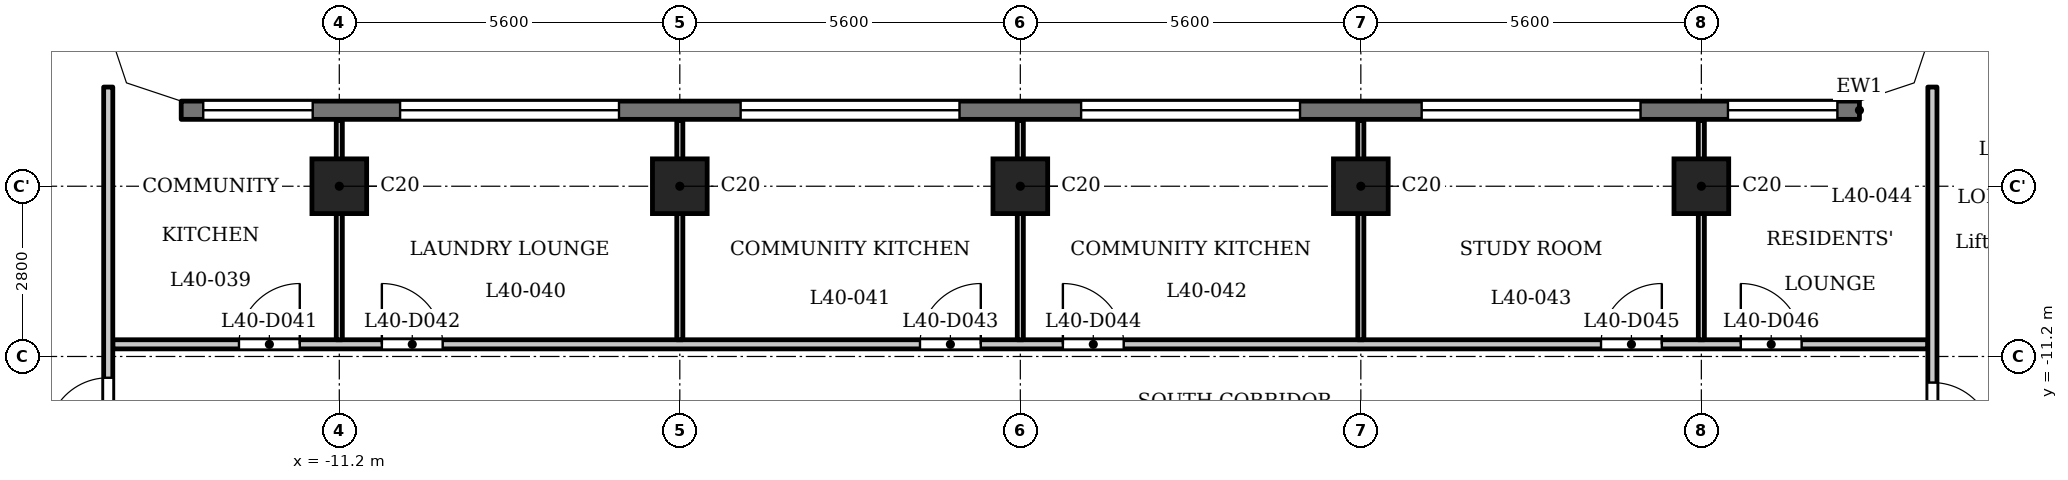
"""IFC4 building model, lengths in metres.
Left out: names, types, materials, properties, quantities, classifications, styles, units other than length and angle.
Written with IfcOpenShell. Run it as: python <this file> out.ifc"""

import sys

from ifc_helpers import new_model, si_unit, direction, frame, frame_2d, origin, origin_2d, place, context, subcontext, project, spatial, polyline, rectangle, outline, extrude, element, fill, save


model = new_model("IFC4")
c1 = context("Model", 3, precision=1e-05, world=origin(), true_north=direction((0.0, 1.0)))
c2 = subcontext(c1, "Body", "Model", "MODEL_VIEW")
j1 = project(units=[si_unit("LENGTHUNIT", "METRE"), si_unit("PLANEANGLEUNIT", "RADIAN")], contexts=[c1])
p1 = place(None, origin())
s1 = spatial("IfcSite", under=j1, at=p1, CompositionType="ELEMENT")
p2 = place(p1, origin())
s2 = spatial("IfcBuilding", under=s1, at=p2, CompositionType="ELEMENT")
p3 = place(p2, frame((0.0, 0.0, 157.1)))
s3 = spatial("IfcBuildingStorey", under=s2, at=p3, CompositionType="ELEMENT", Elevation=157.1)
for number, where, z_axis, x_axis in (
    (1, (-11.2, -8.4, 0.0), (0.0, 0.0, 1.0), (1.0, 0.0, 0.0)),
    (2, (-5.6, -8.4, 0.0), (0.0, 0.0, 1.0), (1.0, 0.0, 0.0)),
    (3, (0.0, -8.4, 0.0), (0.0, 0.0, 1.0), (1.0, 0.0, 0.0)),
    (4, (5.6, -8.4, 0.0), (0.0, 0.0, 1.0), (1.0, 0.0, 0.0)),
    (5, (11.2, -8.4, 0.0), (0.0, 0.0, 1.0), (1.0, 0.0, 0.0)),
):
    element("IfcColumn", number, at=place(p3, frame(where, z_axis=z_axis, x_axis=x_axis)), inside=s3, PredefinedType="COLUMN", context=c2, shape_type="SweptSolid", body=[
        extrude(rectangle(XDim=0.9, YDim=0.9, at=origin_2d()), origin(), (0.0, 0.0, 1.0), 3.5),
    ])
p4 = place(p3, frame((13.8, -7.15, 0.0), z_axis=(0.0, 0.0, 1.0), x_axis=(-1.0, 0.0, 0.0)))
e6 = element("IfcWall", 6, at=p4, inside=s3, PredefinedType="SOLIDWALL", context=c2, shape_type="SweptSolid", body=[
    extrude(rectangle(XDim=27.6, YDim=0.3, at=frame_2d((13.8, 0.0))), origin(), (0.0, 0.0, 1.0), 3.2),
])
p5 = place(p4, frame((0.363, 0.0, 0.9)))
e7 = element("IfcOpeningElement", 7, at=p5, cuts=e6, PredefinedType="OPENING", context=c2, shape_type="SweptSolid", body=[
    extrude(rectangle(XDim=1.8, YDim=1.25, at=frame_2d((0.9, 0.625))), frame((0.0, 0.16, 0.0), z_axis=(0.0, -1.0, 0.0), x_axis=(1.0, 0.0, 0.0)), (0.0, 0.0, 1.0), 0.32),
])
p6 = place(p4, frame((3.6, 0.0, 1.2)))
e8 = element("IfcOpeningElement", 8, at=p6, cuts=e6, PredefinedType="OPENING", context=c2, shape_type="SweptSolid", body=[
    extrude(rectangle(XDim=3.6, YDim=0.95, at=frame_2d((1.8, 0.475))), frame((0.0, 0.16, 0.0), z_axis=(0.0, -1.0, 0.0), x_axis=(1.0, 0.0, 0.0)), (0.0, 0.0, 1.0), 0.32),
])
p7 = place(p4, frame((9.2, 0.0, 1.2)))
e9 = element("IfcOpeningElement", 9, at=p7, cuts=e6, PredefinedType="OPENING", context=c2, shape_type="SweptSolid", body=[
    extrude(rectangle(XDim=3.6, YDim=0.95, at=frame_2d((1.8, 0.475))), frame((0.0, 0.16, 0.0), z_axis=(0.0, -1.0, 0.0), x_axis=(1.0, 0.0, 0.0)), (0.0, 0.0, 1.0), 0.32),
])
p8 = place(p4, frame((14.8, 0.0, 1.2)))
e10 = element("IfcOpeningElement", 10, at=p8, cuts=e6, PredefinedType="OPENING", context=c2, shape_type="SweptSolid", body=[
    extrude(rectangle(XDim=3.6, YDim=0.95, at=frame_2d((1.8, 0.475))), frame((0.0, 0.16, 0.0), z_axis=(0.0, -1.0, 0.0), x_axis=(1.0, 0.0, 0.0)), (0.0, 0.0, 1.0), 0.32),
])
p9 = place(p4, frame((20.4, 0.0, 1.2)))
e11 = element("IfcOpeningElement", 11, at=p9, cuts=e6, PredefinedType="OPENING", context=c2, shape_type="SweptSolid", body=[
    extrude(rectangle(XDim=3.6, YDim=0.95, at=frame_2d((1.8, 0.475))), frame((0.0, 0.16, 0.0), z_axis=(0.0, -1.0, 0.0), x_axis=(1.0, 0.0, 0.0)), (0.0, 0.0, 1.0), 0.32),
])
p10 = place(p4, frame((25.438, 0.0, 0.9)))
e12 = element("IfcOpeningElement", 12, at=p10, cuts=e6, PredefinedType="OPENING", context=c2, shape_type="SweptSolid", body=[
    extrude(rectangle(XDim=1.8, YDim=1.25, at=frame_2d((0.9, 0.625))), frame((0.0, 0.16, 0.0), z_axis=(0.0, -1.0, 0.0), x_axis=(1.0, 0.0, 0.0)), (0.0, 0.0, 1.0), 0.32),
])
p11 = place(p3, frame((-14.925, -11.0, 0.0), z_axis=(0.0, 0.0, 1.0), x_axis=(1.0, 0.0, 0.0)))
e13 = element("IfcWall", 13, at=p11, inside=s3, PredefinedType="PARTITIONING", context=c2, shape_type="SweptSolid", body=[
    extrude(rectangle(XDim=29.85, YDim=0.15, at=frame_2d((14.925, 0.0))), origin(), (0.0, 0.0, 1.0), 3.2),
])
p12 = place(p11, frame((2.075, 0.0, 0.0)))
e14 = element("IfcOpeningElement", 14, at=p12, cuts=e13, PredefinedType="OPENING", context=c2, shape_type="SweptSolid", body=[
    extrude(rectangle(XDim=1.0, YDim=2.1, at=frame_2d((0.5, 1.05))), frame((0.0, 0.085, 0.0), z_axis=(0.0, -1.0, 0.0), x_axis=(1.0, 0.0, 0.0)), (0.0, 0.0, 1.0), 0.17),
])
p13 = place(p11, frame((4.425, 0.0, 0.0)))
e15 = element("IfcOpeningElement", 15, at=p13, cuts=e13, PredefinedType="OPENING", context=c2, shape_type="SweptSolid", body=[
    extrude(rectangle(XDim=1.0, YDim=2.1, at=frame_2d((0.5, 1.05))), frame((0.0, 0.085, 0.0), z_axis=(0.0, -1.0, 0.0), x_axis=(1.0, 0.0, 0.0)), (0.0, 0.0, 1.0), 0.17),
])
p14 = place(p11, frame((13.275, 0.0, 0.0)))
e16 = element("IfcOpeningElement", 16, at=p14, cuts=e13, PredefinedType="OPENING", context=c2, shape_type="SweptSolid", body=[
    extrude(rectangle(XDim=1.0, YDim=2.1, at=frame_2d((0.5, 1.05))), frame((0.0, 0.085, 0.0), z_axis=(0.0, -1.0, 0.0), x_axis=(1.0, 0.0, 0.0)), (0.0, 0.0, 1.0), 0.17),
])
p15 = place(p11, frame((15.625, 0.0, 0.0)))
e17 = element("IfcOpeningElement", 17, at=p15, cuts=e13, PredefinedType="OPENING", context=c2, shape_type="SweptSolid", body=[
    extrude(rectangle(XDim=1.0, YDim=2.1, at=frame_2d((0.5, 1.05))), frame((0.0, 0.085, 0.0), z_axis=(0.0, -1.0, 0.0), x_axis=(1.0, 0.0, 0.0)), (0.0, 0.0, 1.0), 0.17),
])
p16 = place(p11, frame((24.475, 0.0, 0.0)))
e18 = element("IfcOpeningElement", 18, at=p16, cuts=e13, PredefinedType="OPENING", context=c2, shape_type="SweptSolid", body=[
    extrude(rectangle(XDim=1.0, YDim=2.1, at=frame_2d((0.5, 1.05))), frame((0.0, 0.085, 0.0), z_axis=(0.0, -1.0, 0.0), x_axis=(1.0, 0.0, 0.0)), (0.0, 0.0, 1.0), 0.17),
])
p17 = place(p11, frame((26.774, 0.0, 0.0)))
e19 = element("IfcOpeningElement", 19, at=p17, cuts=e13, PredefinedType="OPENING", context=c2, shape_type="SweptSolid", body=[
    extrude(rectangle(XDim=1.0, YDim=2.1, at=frame_2d((0.5, 1.05))), frame((0.0, 0.085, 0.0), z_axis=(0.0, -1.0, 0.0), x_axis=(1.0, 0.0, 0.0)), (0.0, 0.0, 1.0), 0.17),
])
p18 = place(p3, frame((-15.0, -13.125, 0.0), z_axis=(0.0, 0.0, 1.0), x_axis=(0.0, 1.0, 0.0)))
e20 = element("IfcWall", 20, at=p18, inside=s3, PredefinedType="PARTITIONING", context=c2, shape_type="SweptSolid", body=[
    extrude(rectangle(XDim=6.356, YDim=0.15, at=frame_2d((3.178, 0.0))), origin(), (0.0, 0.0, 1.0), 3.2),
])
p19 = place(p18, frame((0.575, 0.0, 0.0)))
e21 = element("IfcOpeningElement", 21, at=p19, cuts=e20, PredefinedType="OPENING", context=c2, shape_type="SweptSolid", body=[
    extrude(rectangle(XDim=1.0, YDim=2.1, at=frame_2d((0.5, 1.05))), frame((0.0, 0.085, 0.0), z_axis=(0.0, -1.0, 0.0), x_axis=(1.0, 0.0, 0.0)), (0.0, 0.0, 1.0), 0.17),
])
for number, where, z_axis, x_axis in (
    (22, (-11.2, -10.925, 0.0), (0.0, 0.0, 1.0), (0.0, 1.0, 0.0)),
    (23, (-5.6, -10.925, 0.0), (0.0, 0.0, 1.0), (0.0, 1.0, 0.0)),
    (24, (0.0, -10.925, 0.0), (0.0, 0.0, 1.0), (0.0, 1.0, 0.0)),
    (25, (5.6, -10.925, 0.0), (0.0, 0.0, 1.0), (0.0, 1.0, 0.0)),
    (26, (11.2, -10.925, 0.0), (0.0, 0.0, 1.0), (0.0, 1.0, 0.0)),
):
    element("IfcWall", number, at=place(p3, frame(where, z_axis=z_axis, x_axis=x_axis)), inside=s3, PredefinedType="PARTITIONING", context=c2, shape_type="SweptSolid", body=[
        extrude(rectangle(XDim=3.605, YDim=0.1, at=frame_2d((1.802, 0.0))), origin(), (0.0, 0.0, 1.0), 3.2),
    ])
p20 = place(p3, frame((15.0, -13.125, 0.0), z_axis=(0.0, 0.0, 1.0), x_axis=(0.0, 1.0, 0.0)))
e27 = element("IfcWall", 27, at=p20, inside=s3, PredefinedType="PARTITIONING", context=c2, shape_type="SweptSolid", body=[
    extrude(rectangle(XDim=6.356, YDim=0.15, at=frame_2d((3.178, 0.0))), origin(), (0.0, 0.0, 1.0), 3.2),
])
p21 = place(p20, frame((0.496, 0.0, 0.0)))
e28 = element("IfcOpeningElement", 28, at=p21, cuts=e27, PredefinedType="OPENING", context=c2, shape_type="SweptSolid", body=[
    extrude(rectangle(XDim=1.0, YDim=2.1, at=frame_2d((0.5, 1.05))), frame((0.0, 0.085, 0.0), z_axis=(0.0, -1.0, 0.0), x_axis=(1.0, 0.0, 0.0)), (0.0, 0.0, 1.0), 0.17),
])
p22 = place(p3, origin())
e29 = element("IfcWall", 29, at=p22, inside=s3, PredefinedType="SOLIDWALL", context=c2, shape_type="SweptSolid", body=[
    extrude(outline(polyline([(14.937, -6.937), (15.3, -5.849), (15.3, -5.8), (15.0, -5.8), (14.7, -6.7), (13.8, -7.0), (13.8, -7.3), (13.849, -7.3), (14.937, -6.937)])), origin(), (0.0, 0.0, 1.0), 3.2),
])
e30 = element("IfcWall", 30, at=p22, inside=s3, PredefinedType="SOLIDWALL", context=c2, shape_type="SweptSolid", body=[
    extrude(outline(polyline([(-14.937, -6.937), (-13.849, -7.3), (-13.8, -7.3), (-13.8, -7.0), (-14.7, -6.7), (-15.0, -5.8), (-15.3, -5.8), (-15.3, -5.849), (-14.937, -6.937)])), origin(), (0.0, 0.0, 1.0), 3.2),
])
p23 = place(p19, origin())
e31 = element("IfcDoor", 31, at=p23, inside=s3, OperationType="SINGLE_SWING_RIGHT", PredefinedType="DOOR", context=c2, shape_type="SweptSolid", body=[
    extrude(rectangle(XDim=1.0, YDim=2.1, at=frame_2d((0.5, 1.05))), frame((0.0, 0.025, 0.0), z_axis=(0.0, -1.0, 0.0), x_axis=(1.0, 0.0, 0.0)), (0.0, 0.0, 1.0), 0.05),
])
fill(e21, e31)
p24 = place(p21, origin())
e32 = element("IfcDoor", 32, at=p24, inside=s3, OperationType="SINGLE_SWING_LEFT", PredefinedType="DOOR", context=c2, shape_type="SweptSolid", body=[
    extrude(rectangle(XDim=1.0, YDim=2.1, at=frame_2d((0.5, 1.05))), frame((0.0, 0.025, 0.0), z_axis=(0.0, -1.0, 0.0), x_axis=(1.0, 0.0, 0.0)), (0.0, 0.0, 1.0), 0.05),
])
fill(e28, e32)
p25 = place(p12, origin())
e33 = element("IfcDoor", 33, at=p25, inside=s3, OperationType="SINGLE_SWING_LEFT", PredefinedType="DOOR", context=c2, shape_type="SweptSolid", body=[
    extrude(rectangle(XDim=1.0, YDim=2.1, at=frame_2d((0.5, 1.05))), frame((0.0, 0.025, 0.0), z_axis=(0.0, -1.0, 0.0), x_axis=(1.0, 0.0, 0.0)), (0.0, 0.0, 1.0), 0.05),
])
fill(e14, e33)
p26 = place(p13, origin())
e34 = element("IfcDoor", 34, at=p26, inside=s3, OperationType="SINGLE_SWING_RIGHT", PredefinedType="DOOR", context=c2, shape_type="SweptSolid", body=[
    extrude(rectangle(XDim=1.0, YDim=2.1, at=frame_2d((0.5, 1.05))), frame((0.0, 0.025, 0.0), z_axis=(0.0, -1.0, 0.0), x_axis=(1.0, 0.0, 0.0)), (0.0, 0.0, 1.0), 0.05),
])
fill(e15, e34)
p27 = place(p14, origin())
e35 = element("IfcDoor", 35, at=p27, inside=s3, OperationType="SINGLE_SWING_LEFT", PredefinedType="DOOR", context=c2, shape_type="SweptSolid", body=[
    extrude(rectangle(XDim=1.0, YDim=2.1, at=frame_2d((0.5, 1.05))), frame((0.0, 0.025, 0.0), z_axis=(0.0, -1.0, 0.0), x_axis=(1.0, 0.0, 0.0)), (0.0, 0.0, 1.0), 0.05),
])
fill(e16, e35)
p28 = place(p15, origin())
e36 = element("IfcDoor", 36, at=p28, inside=s3, OperationType="SINGLE_SWING_RIGHT", PredefinedType="DOOR", context=c2, shape_type="SweptSolid", body=[
    extrude(rectangle(XDim=1.0, YDim=2.1, at=frame_2d((0.5, 1.05))), frame((0.0, 0.025, 0.0), z_axis=(0.0, -1.0, 0.0), x_axis=(1.0, 0.0, 0.0)), (0.0, 0.0, 1.0), 0.05),
])
fill(e17, e36)
p29 = place(p16, origin())
e37 = element("IfcDoor", 37, at=p29, inside=s3, OperationType="SINGLE_SWING_LEFT", PredefinedType="DOOR", context=c2, shape_type="SweptSolid", body=[
    extrude(rectangle(XDim=1.0, YDim=2.1, at=frame_2d((0.5, 1.05))), frame((0.0, 0.025, 0.0), z_axis=(0.0, -1.0, 0.0), x_axis=(1.0, 0.0, 0.0)), (0.0, 0.0, 1.0), 0.05),
])
fill(e18, e37)
p30 = place(p17, origin())
e38 = element("IfcDoor", 38, at=p30, inside=s3, OperationType="SINGLE_SWING_RIGHT", PredefinedType="DOOR", context=c2, shape_type="SweptSolid", body=[
    extrude(rectangle(XDim=1.0, YDim=2.1, at=frame_2d((0.5, 1.05))), frame((0.0, 0.025, 0.0), z_axis=(0.0, -1.0, 0.0), x_axis=(1.0, 0.0, 0.0)), (0.0, 0.0, 1.0), 0.05),
])
fill(e19, e38)
p31 = place(p5, origin())
e39 = element("IfcWindow", 39, at=p31, inside=s3, PartitioningType="SINGLE_PANEL", PredefinedType="WINDOW", context=c2, shape_type="SweptSolid", body=[
    extrude(rectangle(XDim=1.8, YDim=1.25, at=frame_2d((0.9, 0.625))), frame((0.0, 0.03, 0.0), z_axis=(0.0, -1.0, 0.0), x_axis=(1.0, 0.0, 0.0)), (0.0, 0.0, 1.0), 0.06),
])
fill(e7, e39)
p32 = place(p6, origin())
e40 = element("IfcWindow", 40, at=p32, inside=s3, PartitioningType="SINGLE_PANEL", PredefinedType="WINDOW", context=c2, shape_type="SweptSolid", body=[
    extrude(rectangle(XDim=3.6, YDim=0.95, at=frame_2d((1.8, 0.475))), frame((0.0, 0.03, 0.0), z_axis=(0.0, -1.0, 0.0), x_axis=(1.0, 0.0, 0.0)), (0.0, 0.0, 1.0), 0.06),
])
fill(e8, e40)
p33 = place(p7, origin())
e41 = element("IfcWindow", 41, at=p33, inside=s3, PartitioningType="SINGLE_PANEL", PredefinedType="WINDOW", context=c2, shape_type="SweptSolid", body=[
    extrude(rectangle(XDim=3.6, YDim=0.95, at=frame_2d((1.8, 0.475))), frame((0.0, 0.03, 0.0), z_axis=(0.0, -1.0, 0.0), x_axis=(1.0, 0.0, 0.0)), (0.0, 0.0, 1.0), 0.06),
])
fill(e9, e41)
p34 = place(p8, origin())
e42 = element("IfcWindow", 42, at=p34, inside=s3, PartitioningType="SINGLE_PANEL", PredefinedType="WINDOW", context=c2, shape_type="SweptSolid", body=[
    extrude(rectangle(XDim=3.6, YDim=0.95, at=frame_2d((1.8, 0.475))), frame((0.0, 0.03, 0.0), z_axis=(0.0, -1.0, 0.0), x_axis=(1.0, 0.0, 0.0)), (0.0, 0.0, 1.0), 0.06),
])
fill(e10, e42)
p35 = place(p9, origin())
e43 = element("IfcWindow", 43, at=p35, inside=s3, PartitioningType="SINGLE_PANEL", PredefinedType="WINDOW", context=c2, shape_type="SweptSolid", body=[
    extrude(rectangle(XDim=3.6, YDim=0.95, at=frame_2d((1.8, 0.475))), frame((0.0, 0.03, 0.0), z_axis=(0.0, -1.0, 0.0), x_axis=(1.0, 0.0, 0.0)), (0.0, 0.0, 1.0), 0.06),
])
fill(e11, e43)
p36 = place(p10, origin())
e44 = element("IfcWindow", 44, at=p36, inside=s3, PartitioningType="SINGLE_PANEL", PredefinedType="WINDOW", context=c2, shape_type="SweptSolid", body=[
    extrude(rectangle(XDim=1.8, YDim=1.25, at=frame_2d((0.9, 0.625))), frame((0.0, 0.03, 0.0), z_axis=(0.0, -1.0, 0.0), x_axis=(1.0, 0.0, 0.0)), (0.0, 0.0, 1.0), 0.06),
])
fill(e12, e44)
save(model, sys.argv[1])
